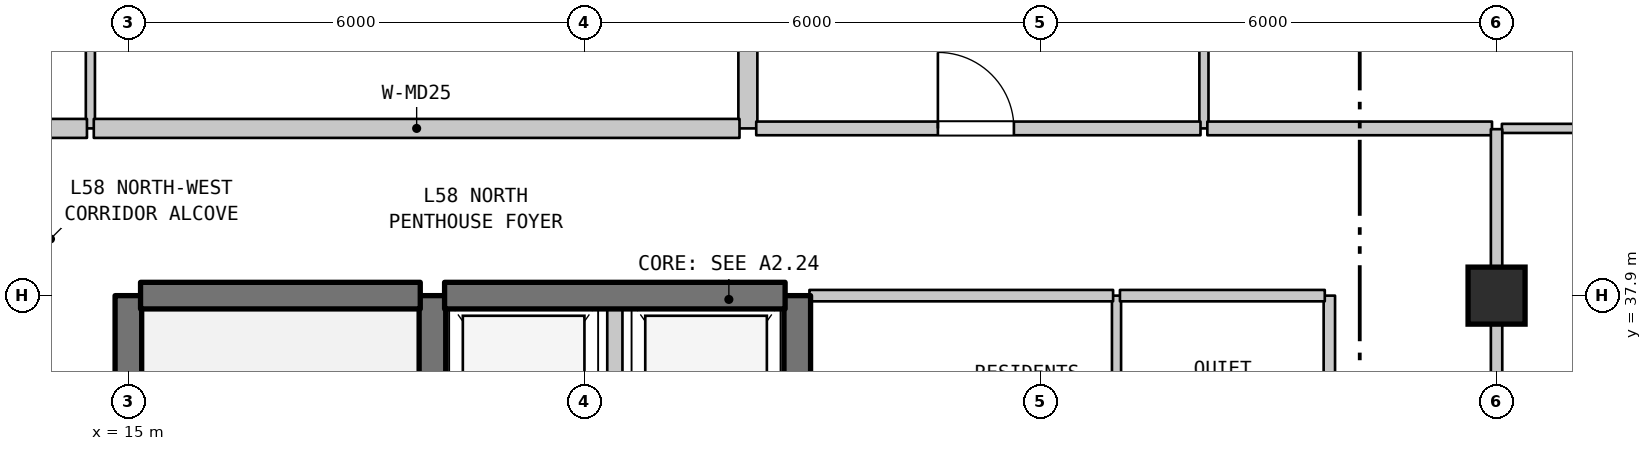
"""IFC4 building model, lengths in metres.
Left out: names, types, materials, properties, quantities, classifications, styles, units other than length and angle.
Written with IfcOpenShell. Run it as: python <this file> out.ifc"""

import sys

from ifc_helpers import new_model, si_unit, direction, frame, frame_2d, origin, origin_2d, place, context, subcontext, project, spatial, rectangle, extrude, element, fill, save


model = new_model("IFC4")
c1 = context("Model", 3, precision=1e-05, world=origin(), true_north=direction((0.0, 1.0)))
c2 = subcontext(c1, "Body", "Model", "MODEL_VIEW")
j1 = project(units=[si_unit("LENGTHUNIT", "METRE"), si_unit("PLANEANGLEUNIT", "RADIAN")], contexts=[c1])
p1 = place(None, origin())
s1 = spatial("IfcSite", under=j1, at=p1, CompositionType="ELEMENT")
p2 = place(p1, origin())
s2 = spatial("IfcBuilding", under=s1, at=p2, CompositionType="ELEMENT")
p3 = place(p2, frame((0.0, 0.0, 233.9)))
s3 = spatial("IfcBuildingStorey", under=s2, at=p3, CompositionType="ELEMENT", Elevation=233.9)
p4 = place(p3, frame((33.0, 37.9, 0.0), z_axis=(0.0, 0.0, 1.0), x_axis=(1.0, 0.0, 0.0)))
e1 = element("IfcColumn", 1, at=p4, inside=s3, PredefinedType="COLUMN", context=c2, shape_type="SweptSolid", body=[
    extrude(rectangle(XDim=0.75, YDim=0.75, at=origin_2d()), origin(), (0.0, 0.0, 1.0), 3.7),
])
p5 = place(p3, frame((14.5, 40.1, 0.0), z_axis=(0.0, 0.0, 1.0), x_axis=(0.0, 1.0, 0.0)))
e2 = element("IfcWall", 2, at=p5, inside=s3, PredefinedType="PARTITIONING", context=c2, shape_type="SweptSolid", body=[
    extrude(rectangle(XDim=4.2, YDim=0.12, at=frame_2d((2.1, 0.0))), origin(), (0.0, 0.0, 1.0), 3.28),
])
p6 = place(p3, frame((15.0, 31.1, 0.0), z_axis=(0.0, 0.0, 1.0), x_axis=(0.0, 1.0, 0.0)))
e3 = element("IfcWall", 3, at=p6, inside=s3, PredefinedType="SHEAR", context=c2, shape_type="SweptSolid", body=[
    extrude(rectangle(XDim=6.8, YDim=0.35, at=frame_2d((3.4, 0.0))), origin(), (0.0, 0.0, 1.0), 3.28),
])
p7 = place(p3, frame((19.0, 35.0, 0.0), z_axis=(0.0, 0.0, 1.0), x_axis=(0.0, 1.0, 0.0)))
e4 = element("IfcWall", 4, at=p7, inside=s3, PredefinedType="SHEAR", context=c2, shape_type="SweptSolid", body=[
    extrude(rectangle(XDim=2.9, YDim=0.35, at=frame_2d((1.45, 0.0))), origin(), (0.0, 0.0, 1.0), 3.28),
])
p8 = place(p3, frame((21.4, 35.0, 0.0), z_axis=(0.0, 0.0, 1.0), x_axis=(0.0, 1.0, 0.0)))
e5 = element("IfcWall", 5, at=p8, inside=s3, PredefinedType="STANDARD", context=c2, shape_type="SweptSolid", body=[
    extrude(rectangle(XDim=2.9, YDim=0.2, at=frame_2d((1.45, 0.0))), origin(), (0.0, 0.0, 1.0), 3.28),
])
p9 = place(p3, frame((23.15, 40.1, 0.0), z_axis=(0.0, 0.0, 1.0), x_axis=(0.0, 1.0, 0.0)))
e6 = element("IfcWall", 6, at=p9, inside=s3, PredefinedType="STANDARD", context=c2, shape_type="SweptSolid", body=[
    extrude(rectangle(XDim=4.2, YDim=0.25, at=frame_2d((2.1, 0.0))), origin(), (0.0, 0.0, 1.0), 3.28),
])
p10 = place(p9, frame((1.577, 0.0, 0.0)))
e7 = element("IfcOpeningElement", 7, at=p10, cuts=e6, PredefinedType="OPENING", context=c2, shape_type="SweptSolid", body=[
    extrude(rectangle(XDim=0.9, YDim=2.15, at=frame_2d((0.45, 1.075))), frame((0.0, 0.135, 0.0), z_axis=(0.0, -1.0, 0.0), x_axis=(1.0, 0.0, 0.0)), (0.0, 0.0, 1.0), 0.27),
])
p11 = place(p3, frame((23.8, 35.0, 0.0), z_axis=(0.0, 0.0, 1.0), x_axis=(0.0, 1.0, 0.0)))
e8 = element("IfcWall", 8, at=p11, inside=s3, PredefinedType="SHEAR", context=c2, shape_type="SweptSolid", body=[
    extrude(rectangle(XDim=2.9, YDim=0.35, at=frame_2d((1.45, 0.0))), origin(), (0.0, 0.0, 1.0), 3.28),
])
p12 = place(p3, frame((28.0, 35.0, 0.0), z_axis=(0.0, 0.0, 1.0), x_axis=(0.0, 1.0, 0.0)))
e9 = element("IfcWall", 9, at=p12, inside=s3, PredefinedType="PARTITIONING", context=c2, shape_type="SweptSolid", body=[
    extrude(rectangle(XDim=2.9, YDim=0.12, at=frame_2d((1.45, 0.0))), origin(), (0.0, 0.0, 1.0), 3.28),
])
p13 = place(p3, frame((29.15, 40.1, 0.0), z_axis=(0.0, 0.0, 1.0), x_axis=(0.0, 1.0, 0.0)))
e10 = element("IfcWall", 10, at=p13, inside=s3, PredefinedType="PARTITIONING", context=c2, shape_type="SweptSolid", body=[
    extrude(rectangle(XDim=13.79, YDim=0.12, at=frame_2d((6.895, 0.0))), origin(), (0.0, 0.0, 1.0), 3.28),
])
p14 = place(p13, frame((6.2, 0.0, 0.0)))
e11 = element("IfcOpeningElement", 11, at=p14, cuts=e10, PredefinedType="OPENING", context=c2, shape_type="SweptSolid", body=[
    extrude(rectangle(XDim=0.9, YDim=2.15, at=frame_2d((0.45, 1.075))), frame((0.0, 0.07, 0.0), z_axis=(0.0, -1.0, 0.0), x_axis=(1.0, 0.0, 0.0)), (0.0, 0.0, 1.0), 0.14),
])
p15 = place(p3, frame((30.8, 35.0, 0.0), z_axis=(0.0, 0.0, 1.0), x_axis=(0.0, 1.0, 0.0)))
e12 = element("IfcWall", 12, at=p15, inside=s3, PredefinedType="STANDARD", context=c2, shape_type="SweptSolid", body=[
    extrude(rectangle(XDim=2.9, YDim=0.15, at=frame_2d((1.45, 0.0))), origin(), (0.0, 0.0, 1.0), 3.28),
])
p16 = place(p3, frame((33.0, 19.51, 0.0), z_axis=(0.0, 0.0, 1.0), x_axis=(0.0, 1.0, 0.0)))
e13 = element("IfcWall", 13, at=p16, inside=s3, PredefinedType="STANDARD", context=c2, shape_type="SweptSolid", body=[
    extrude(rectangle(XDim=18.39, YDim=0.15, at=frame_2d((9.195, 0.0))), origin(), (0.0, 0.0, 1.0), 2.78),
])
p17 = place(p16, frame((9.79, 0.0, 0.0)))
e14 = element("IfcOpeningElement", 14, at=p17, cuts=e13, PredefinedType="OPENING", context=c2, shape_type="SweptSolid", body=[
    extrude(rectangle(XDim=1.0, YDim=2.15, at=frame_2d((0.5, 1.075))), frame((0.0, 0.085, 0.0), z_axis=(0.0, -1.0, 0.0), x_axis=(1.0, 0.0, 0.0)), (0.0, 0.0, 1.0), 0.17),
])
p18 = place(p3, frame((15.16, 37.9, 0.0), z_axis=(0.0, 0.0, 1.0), x_axis=(1.0, 0.0, 0.0)))
e15 = element("IfcWall", 15, at=p18, inside=s3, PredefinedType="SHEAR", context=c2, shape_type="SweptSolid", body=[
    extrude(rectangle(XDim=3.68, YDim=0.35, at=frame_2d((1.84, 0.0))), origin(), (0.0, 0.0, 1.0), 3.28),
])
p19 = place(p3, frame((19.16, 37.9, 0.0), z_axis=(0.0, 0.0, 1.0), x_axis=(1.0, 0.0, 0.0)))
e16 = element("IfcWall", 16, at=p19, inside=s3, PredefinedType="SHEAR", context=c2, shape_type="SweptSolid", body=[
    extrude(rectangle(XDim=4.48, YDim=0.35, at=frame_2d((2.24, 0.0))), origin(), (0.0, 0.0, 1.0), 3.28),
])
p20 = place(p3, frame((23.96, 37.9, 0.0), z_axis=(0.0, 0.0, 1.0), x_axis=(1.0, 0.0, 0.0)))
e17 = element("IfcWall", 17, at=p20, inside=s3, PredefinedType="STANDARD", context=c2, shape_type="SweptSolid", body=[
    extrude(rectangle(XDim=3.995, YDim=0.15, at=frame_2d((1.998, 0.0))), origin(), (0.0, 0.0, 1.0), 2.68),
])
p21 = place(p3, frame((28.045, 37.9, 0.0), z_axis=(0.0, 0.0, 1.0), x_axis=(1.0, 0.0, 0.0)))
e18 = element("IfcWall", 18, at=p21, inside=s3, PredefinedType="STANDARD", context=c2, shape_type="SweptSolid", body=[
    extrude(rectangle(XDim=2.695, YDim=0.15, at=frame_2d((1.348, 0.0))), origin(), (0.0, 0.0, 1.0), 2.68),
])
p22 = place(p3, frame((12.975, 40.1, 0.0), z_axis=(0.0, 0.0, 1.0), x_axis=(1.0, 0.0, 0.0)))
e19 = element("IfcWall", 19, at=p22, inside=s3, PredefinedType="STANDARD", context=c2, shape_type="SweptSolid", body=[
    extrude(rectangle(XDim=1.48, YDim=0.25, at=frame_2d((0.74, 0.0))), origin(), (0.0, 0.0, 1.0), 3.28),
])
p23 = place(p3, frame((14.545, 40.1, 0.0), z_axis=(0.0, 0.0, 1.0), x_axis=(1.0, 0.0, 0.0)))
e20 = element("IfcWall", 20, at=p23, inside=s3, PredefinedType="STANDARD", context=c2, shape_type="SweptSolid", body=[
    extrude(rectangle(XDim=8.495, YDim=0.25, at=frame_2d((4.248, 0.0))), origin(), (0.0, 0.0, 1.0), 3.28),
])
p24 = place(p3, frame((23.26, 40.1, 0.0), z_axis=(0.0, 0.0, 1.0), x_axis=(1.0, 0.0, 0.0)))
e21 = element("IfcWall", 21, at=p24, inside=s3, PredefinedType="STANDARD", context=c2, shape_type="SweptSolid", body=[
    extrude(rectangle(XDim=5.845, YDim=0.18, at=frame_2d((2.922, 0.0))), origin(), (0.0, 0.0, 1.0), 3.28),
])
p25 = place(p24, frame((2.39, 0.0, 0.0)))
e22 = element("IfcOpeningElement", 22, at=p25, cuts=e21, PredefinedType="OPENING", context=c2, shape_type="SweptSolid", body=[
    extrude(rectangle(XDim=1.0, YDim=2.15, at=frame_2d((0.5, 1.075))), frame((0.0, 0.1, 0.0), z_axis=(0.0, -1.0, 0.0), x_axis=(1.0, 0.0, 0.0)), (0.0, 0.0, 1.0), 0.2),
])
p26 = place(p3, frame((29.195, 40.1, 0.0), z_axis=(0.0, 0.0, 1.0), x_axis=(1.0, 0.0, 0.0)))
e23 = element("IfcWall", 23, at=p26, inside=s3, PredefinedType="STANDARD", context=c2, shape_type="SweptSolid", body=[
    extrude(rectangle(XDim=3.745, YDim=0.18, at=frame_2d((1.873, 0.0))), origin(), (0.0, 0.0, 1.0), 3.28),
])
p27 = place(p3, frame((33.07, 40.1, 0.0), z_axis=(0.0, 0.0, 1.0), x_axis=(1.0, 0.0, 0.0)))
e24 = element("IfcWall", 24, at=p27, inside=s3, PredefinedType="PARTITIONING", context=c2, shape_type="SweptSolid", body=[
    extrude(rectangle(XDim=1.105, YDim=0.12, at=frame_2d((0.552, 0.0))), origin(), (0.0, 0.0, 1.0), 3.28),
])
p28 = place(p3, frame((33.0, 37.9, 0.0), z_axis=(0.0, 0.0, 1.0), x_axis=(0.0, 1.0, 0.0)))
e25 = element("IfcWall", 25, at=p28, inside=s3, PredefinedType="STANDARD", context=c2, shape_type="SweptSolid", body=[
    extrude(rectangle(XDim=2.19, YDim=0.15, at=frame_2d((1.095, 0.0))), origin(), (0.0, 0.0, 1.0), 2.68),
])
p29 = place(p25, origin())
e26 = element("IfcDoor", 26, at=p29, inside=s3, OperationType="SINGLE_SWING_LEFT", PredefinedType="DOOR", context=c2, shape_type="SweptSolid", body=[
    extrude(rectangle(XDim=1.0, YDim=2.15, at=frame_2d((0.5, 1.075))), frame((0.0, 0.025, 0.0), z_axis=(0.0, -1.0, 0.0), x_axis=(1.0, 0.0, 0.0)), (0.0, 0.0, 1.0), 0.05),
])
fill(e22, e26)
save(model, sys.argv[1])
